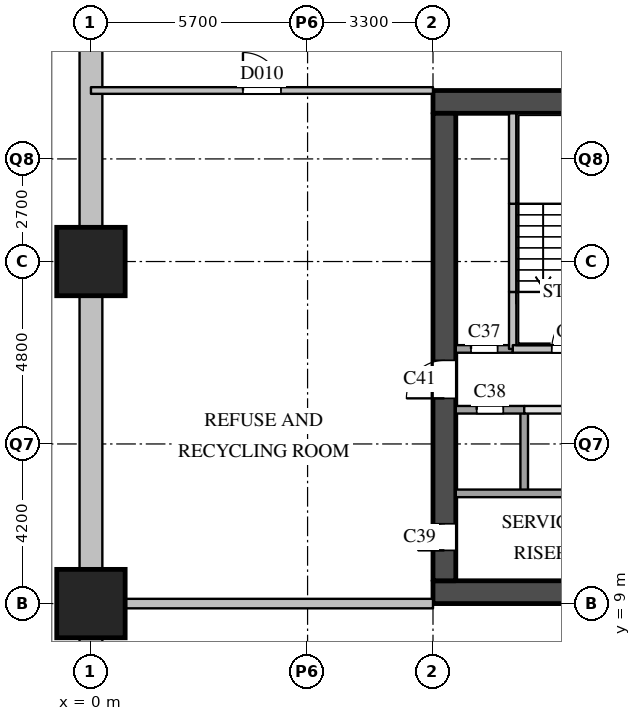
"""IFC4 building model, lengths in metres.
Left out: names, types, materials, properties, quantities, classifications, styles, units other than length and angle.
Written with IfcOpenShell. Run it as: python <this file> out.ifc"""

import sys

from ifc_helpers import new_model, si_unit, direction, frame, frame_2d, origin, origin_2d, place, context, subcontext, project, spatial, rectangle, extrude, element, fill, save


model = new_model("IFC4")
c1 = context("Model", 3, precision=1e-05, world=origin(), true_north=direction((0.0, 1.0)))
c2 = subcontext(c1, "Body", "Model", "MODEL_VIEW")
j1 = project(units=[si_unit("LENGTHUNIT", "METRE"), si_unit("PLANEANGLEUNIT", "RADIAN")], contexts=[c1])
p1 = place(None, origin())
s1 = spatial("IfcSite", under=j1, at=p1, CompositionType="ELEMENT")
p2 = place(p1, origin())
s2 = spatial("IfcBuilding", under=s1, at=p2, CompositionType="ELEMENT")
p3 = place(p2, frame((0.0, 0.0, -6.0)))
s3 = spatial("IfcBuildingStorey", under=s2, at=p3, CompositionType="ELEMENT", Elevation=-6.0)
for number, where, z_axis, x_axis in (
    (1, (0.0, 9.0, 0.0), (0.0, 0.0, 1.0), (1.0, 0.0, 0.0)),
    (2, (0.0, 18.0, 0.0), (0.0, 0.0, 1.0), (1.0, 0.0, 0.0)),
):
    element("IfcColumn", number, at=place(p3, frame(where, z_axis=z_axis, x_axis=x_axis)), inside=s3, PredefinedType="COLUMN", context=c2, shape_type="SweptSolid", body=[
        extrude(rectangle(XDim=1.8, YDim=1.8, at=origin_2d()), origin(), (0.0, 0.0, 1.0), 6.0),
    ])
for number, where, z_axis, x_axis in (
    (3, (0.0, 26.1, 0.0), (0.0, 0.0, 1.0), (0.0, -1.0, 0.0)),
    (4, (0.0, 17.1, 0.0), (0.0, 0.0, 1.0), (0.0, -1.0, 0.0)),
):
    element("IfcWall", number, at=place(p3, frame(where, z_axis=z_axis, x_axis=x_axis)), inside=s3, PredefinedType="SOLIDWALL", context=c2, shape_type="SweptSolid", body=[
        extrude(rectangle(XDim=7.2, YDim=0.6, at=frame_2d((3.6, 0.0))), origin(), (0.0, 0.0, 1.0), 5.59),
    ])
p4 = place(p3, frame((0.0, 8.1, 0.0), z_axis=(0.0, 0.0, 1.0), x_axis=(0.0, -1.0, 0.0)))
e5 = element("IfcWall", 5, at=p4, inside=s3, PredefinedType="SOLIDWALL", context=c2, shape_type="SweptSolid", body=[
    extrude(rectangle(XDim=3.6, YDim=0.6, at=frame_2d((1.8, 0.0))), origin(), (0.0, 0.0, 1.0), 5.59),
])
for number, where, z_axis, x_axis in (
    (6, (9.0, 9.3, 0.0), (0.0, 0.0, 1.0), (1.0, 0.0, 0.0)),
    (7, (9.0, 22.2, 0.0), (0.0, 0.0, 1.0), (1.0, 0.0, 0.0)),
):
    element("IfcWall", number, at=place(p3, frame(where, z_axis=z_axis, x_axis=x_axis)), inside=s3, PredefinedType="SHEAR", context=c2, shape_type="SweptSolid", body=[
        extrude(rectangle(XDim=9.0, YDim=0.6, at=frame_2d((4.5, 0.0))), origin(), (0.0, 0.0, 1.0), 5.59),
    ])
p5 = place(p3, frame((9.3, 9.6, 0.0), z_axis=(0.0, 0.0, 1.0), x_axis=(0.0, 1.0, 0.0)))
e8 = element("IfcWall", 8, at=p5, inside=s3, PredefinedType="SHEAR", context=c2, shape_type="SweptSolid", body=[
    extrude(rectangle(XDim=12.3, YDim=0.6, at=frame_2d((6.15, 0.0))), origin(), (0.0, 0.0, 1.0), 5.59),
])
p6 = place(p5, frame((0.8, 0.0, 0.0)))
e9 = element("IfcOpeningElement", 9, at=p6, cuts=e8, PredefinedType="OPENING", context=c2, shape_type="SweptSolid", body=[
    extrude(rectangle(XDim=0.7, YDim=2.1, at=frame_2d((0.35, 1.05))), frame((0.0, 0.31, 0.0), z_axis=(0.0, -1.0, 0.0), x_axis=(1.0, 0.0, 0.0)), (0.0, 0.0, 1.0), 0.62),
])
p7 = place(p5, frame((4.8, 0.0, 0.0)))
e10 = element("IfcOpeningElement", 10, at=p7, cuts=e8, PredefinedType="OPENING", context=c2, shape_type="SweptSolid", body=[
    extrude(rectangle(XDim=1.0, YDim=2.1, at=frame_2d((0.5, 1.05))), frame((0.0, 0.31, 0.0), z_axis=(0.0, -1.0, 0.0), x_axis=(1.0, 0.0, 0.0)), (0.0, 0.0, 1.0), 0.62),
])
p8 = place(p3, frame((11.1, 15.7, 0.0), z_axis=(0.0, 0.0, 1.0), x_axis=(0.0, 1.0, 0.0)))
e11 = element("IfcWall", 11, at=p8, inside=s3, PredefinedType="SOLIDWALL", context=c2, shape_type="SweptSolid", body=[
    extrude(rectangle(XDim=1.5, YDim=0.2, at=frame_2d((0.75, 0.0))), origin(), (0.0, 0.0, 1.0), 5.59),
])
p9 = place(p3, frame((11.1, 17.2, 0.0), z_axis=(0.0, 0.0, 1.0), x_axis=(0.0, 1.0, 0.0)))
e12 = element("IfcWall", 12, at=p9, inside=s3, PredefinedType="SOLIDWALL", context=c2, shape_type="SweptSolid", body=[
    extrude(rectangle(XDim=2.32, YDim=0.2, at=frame_2d((1.16, 0.0))), origin(), (0.0, 0.0, 1.0), 5.59),
])
p10 = place(p3, frame((11.1, 19.52, 0.0), z_axis=(0.0, 0.0, 1.0), x_axis=(0.0, 1.0, 0.0)))
e13 = element("IfcWall", 13, at=p10, inside=s3, PredefinedType="SOLIDWALL", context=c2, shape_type="SweptSolid", body=[
    extrude(rectangle(XDim=2.38, YDim=0.2, at=frame_2d((1.19, 0.0))), origin(), (0.0, 0.0, 1.0), 5.59),
])
p11 = place(p3, frame((11.4, 11.9, 0.0), z_axis=(0.0, 0.0, 1.0), x_axis=(0.0, 1.0, 0.0)))
e14 = element("IfcWall", 14, at=p11, inside=s3, PredefinedType="SOLIDWALL", context=c2, shape_type="SweptSolid", body=[
    extrude(rectangle(XDim=2.2, YDim=0.2, at=frame_2d((1.1, 0.0))), origin(), (0.0, 0.0, 1.0), 5.59),
])
p12 = place(p3, frame((9.6, 11.9, 0.0), z_axis=(0.0, 0.0, 1.0), x_axis=(1.0, 0.0, 0.0)))
e15 = element("IfcWall", 15, at=p12, inside=s3, PredefinedType="SOLIDWALL", context=c2, shape_type="SweptSolid", body=[
    extrude(rectangle(XDim=4.6, YDim=0.2, at=frame_2d((2.3, 0.0))), origin(), (0.0, 0.0, 1.0), 5.59),
])
p13 = place(p3, frame((11.4, 14.1, 0.0), z_axis=(0.0, 0.0, 1.0), x_axis=(1.0, 0.0, 0.0)))
e16 = element("IfcWall", 16, at=p13, inside=s3, PredefinedType="PARTITIONING", context=c2, shape_type="SweptSolid", body=[
    extrude(rectangle(XDim=6.0, YDim=0.2, at=frame_2d((3.0, 0.0))), origin(), (0.0, 0.0, 1.0), 5.59),
])
p14 = place(p13, frame((1.2, 0.0, 0.0)))
e17 = element("IfcOpeningElement", 17, at=p14, cuts=e16, PredefinedType="OPENING", context=c2, shape_type="SweptSolid", body=[
    extrude(rectangle(XDim=1.5, YDim=2.1, at=frame_2d((0.75, 1.05))), frame((0.0, 0.11, 0.0), z_axis=(0.0, -1.0, 0.0), x_axis=(1.0, 0.0, 0.0)), (0.0, 0.0, 1.0), 0.22),
])
p15 = place(p13, frame((4.2, 0.0, 0.0)))
e18 = element("IfcOpeningElement", 18, at=p15, cuts=e16, PredefinedType="OPENING", context=c2, shape_type="SweptSolid", body=[
    extrude(rectangle(XDim=1.5, YDim=2.1, at=frame_2d((0.75, 1.05))), frame((0.0, 0.11, 0.0), z_axis=(0.0, -1.0, 0.0), x_axis=(1.0, 0.0, 0.0)), (0.0, 0.0, 1.0), 0.22),
])
p16 = place(p3, frame((9.6, 14.1, 0.0), z_axis=(0.0, 0.0, 1.0), x_axis=(1.0, 0.0, 0.0)))
e19 = element("IfcWall", 19, at=p16, inside=s3, PredefinedType="SOLIDWALL", context=c2, shape_type="SweptSolid", body=[
    extrude(rectangle(XDim=1.8, YDim=0.2, at=frame_2d((0.9, 0.0))), origin(), (0.0, 0.0, 1.0), 5.59),
])
p17 = place(p16, frame((0.55, 0.0, 0.0)))
e20 = element("IfcOpeningElement", 20, at=p17, cuts=e19, PredefinedType="OPENING", context=c2, shape_type="SweptSolid", body=[
    extrude(rectangle(XDim=0.7, YDim=2.1, at=frame_2d((0.35, 1.05))), frame((0.0, 0.11, 0.0), z_axis=(0.0, -1.0, 0.0), x_axis=(1.0, 0.0, 0.0)), (0.0, 0.0, 1.0), 0.22),
])
p18 = place(p3, frame((9.6, 15.7, 0.0), z_axis=(0.0, 0.0, 1.0), x_axis=(1.0, 0.0, 0.0)))
e21 = element("IfcWall", 21, at=p18, inside=s3, PredefinedType="SOLIDWALL", context=c2, shape_type="SweptSolid", body=[
    extrude(rectangle(XDim=1.5, YDim=0.2, at=frame_2d((0.75, 0.0))), origin(), (0.0, 0.0, 1.0), 5.59),
])
p19 = place(p18, frame((0.4, 0.0, 0.0)))
e22 = element("IfcOpeningElement", 22, at=p19, cuts=e21, PredefinedType="OPENING", context=c2, shape_type="SweptSolid", body=[
    extrude(rectangle(XDim=0.7, YDim=2.1, at=frame_2d((0.35, 1.05))), frame((0.0, 0.11, 0.0), z_axis=(0.0, -1.0, 0.0), x_axis=(1.0, 0.0, 0.0)), (0.0, 0.0, 1.0), 0.22),
])
p20 = place(p3, frame((11.1, 15.7, 0.0), z_axis=(0.0, 0.0, 1.0), x_axis=(1.0, 0.0, 0.0)))
e23 = element("IfcWall", 23, at=p20, inside=s3, PredefinedType="SOLIDWALL", context=c2, shape_type="SweptSolid", body=[
    extrude(rectangle(XDim=3.05, YDim=0.2, at=frame_2d((1.525, 0.0))), origin(), (0.0, 0.0, 1.0), 5.59),
])
p21 = place(p20, frame((1.025, 0.0, 0.0)))
e24 = element("IfcOpeningElement", 24, at=p21, cuts=e23, PredefinedType="OPENING", context=c2, shape_type="SweptSolid", body=[
    extrude(rectangle(XDim=1.1, YDim=2.1, at=frame_2d((0.55, 1.05))), frame((0.0, 0.11, 0.0), z_axis=(0.0, -1.0, 0.0), x_axis=(1.0, 0.0, 0.0)), (0.0, 0.0, 1.0), 0.22),
])
p22 = place(p3, frame((0.0, 22.5, 0.0), z_axis=(0.0, 0.0, 1.0), x_axis=(1.0, 0.0, 0.0)))
e25 = element("IfcWall", 25, at=p22, inside=s3, PredefinedType="PARTITIONING", context=c2, shape_type="SweptSolid", body=[
    extrude(rectangle(XDim=9.0, YDim=0.175, at=frame_2d((4.5, 0.0))), origin(), (0.0, 0.0, 1.0), 5.59),
])
p23 = place(p22, frame((4.0, 0.0, 0.0)))
e26 = element("IfcOpeningElement", 26, at=p23, cuts=e25, PredefinedType="OPENING", context=c2, shape_type="SweptSolid", body=[
    extrude(rectangle(XDim=1.0, YDim=2.1, at=frame_2d((0.5, 1.05))), frame((0.0, 0.097, 0.0), z_axis=(0.0, -1.0, 0.0), x_axis=(1.0, 0.0, 0.0)), (0.0, 0.0, 1.0), 0.195),
])
p24 = place(p3, frame((0.0, 9.0, 0.0), z_axis=(0.0, 0.0, 1.0), x_axis=(1.0, 0.0, 0.0)))
e27 = element("IfcWall", 27, at=p24, inside=s3, PredefinedType="PARTITIONING", context=c2, shape_type="SweptSolid", body=[
    extrude(rectangle(XDim=9.0, YDim=0.25, at=frame_2d((4.5, 0.0))), origin(), (0.0, 0.0, 1.0), 5.59),
])
p25 = place(p21, origin())
e28 = element("IfcDoor", 28, at=p25, inside=s3, OperationType="SINGLE_SWING_RIGHT", PredefinedType="DOOR", context=c2, shape_type="SweptSolid", body=[
    extrude(rectangle(XDim=1.1, YDim=2.1, at=frame_2d((0.55, 1.05))), frame((0.0, 0.025, 0.0), z_axis=(0.0, -1.0, 0.0), x_axis=(1.0, 0.0, 0.0)), (0.0, 0.0, 1.0), 0.05),
])
fill(e24, e28)
p26 = place(p19, origin())
e29 = element("IfcDoor", 29, at=p26, inside=s3, OperationType="SINGLE_SWING_LEFT", PredefinedType="DOOR", context=c2, shape_type="SweptSolid", body=[
    extrude(rectangle(XDim=0.7, YDim=2.1, at=frame_2d((0.35, 1.05))), frame((0.0, 0.025, 0.0), z_axis=(0.0, -1.0, 0.0), x_axis=(1.0, 0.0, 0.0)), (0.0, 0.0, 1.0), 0.05),
])
fill(e22, e29)
p27 = place(p17, origin())
e30 = element("IfcDoor", 30, at=p27, inside=s3, OperationType="SINGLE_SWING_LEFT", PredefinedType="DOOR", context=c2, shape_type="SweptSolid", body=[
    extrude(rectangle(XDim=0.7, YDim=2.1, at=frame_2d((0.35, 1.05))), frame((0.0, 0.025, 0.0), z_axis=(0.0, -1.0, 0.0), x_axis=(1.0, 0.0, 0.0)), (0.0, 0.0, 1.0), 0.05),
])
fill(e20, e30)
p28 = place(p6, origin())
e31 = element("IfcDoor", 31, at=p28, inside=s3, OperationType="SINGLE_SWING_LEFT", PredefinedType="DOOR", context=c2, shape_type="SweptSolid", body=[
    extrude(rectangle(XDim=0.7, YDim=2.1, at=frame_2d((0.35, 1.05))), frame((0.0, 0.025, 0.0), z_axis=(0.0, -1.0, 0.0), x_axis=(1.0, 0.0, 0.0)), (0.0, 0.0, 1.0), 0.05),
])
fill(e9, e31)
p29 = place(p7, origin())
e32 = element("IfcDoor", 32, at=p29, inside=s3, OperationType="SINGLE_SWING_LEFT", PredefinedType="DOOR", context=c2, shape_type="SweptSolid", body=[
    extrude(rectangle(XDim=1.0, YDim=2.1, at=frame_2d((0.5, 1.05))), frame((0.0, 0.025, 0.0), z_axis=(0.0, -1.0, 0.0), x_axis=(1.0, 0.0, 0.0)), (0.0, 0.0, 1.0), 0.05),
])
fill(e10, e32)
p30 = place(p23, origin())
e33 = element("IfcDoor", 33, at=p30, inside=s3, OperationType="SINGLE_SWING_LEFT", PredefinedType="DOOR", context=c2, shape_type="SweptSolid", body=[
    extrude(rectangle(XDim=1.0, YDim=2.1, at=frame_2d((0.5, 1.05))), frame((0.0, 0.025, 0.0), z_axis=(0.0, -1.0, 0.0), x_axis=(1.0, 0.0, 0.0)), (0.0, 0.0, 1.0), 0.05),
])
fill(e26, e33)
save(model, sys.argv[1])
